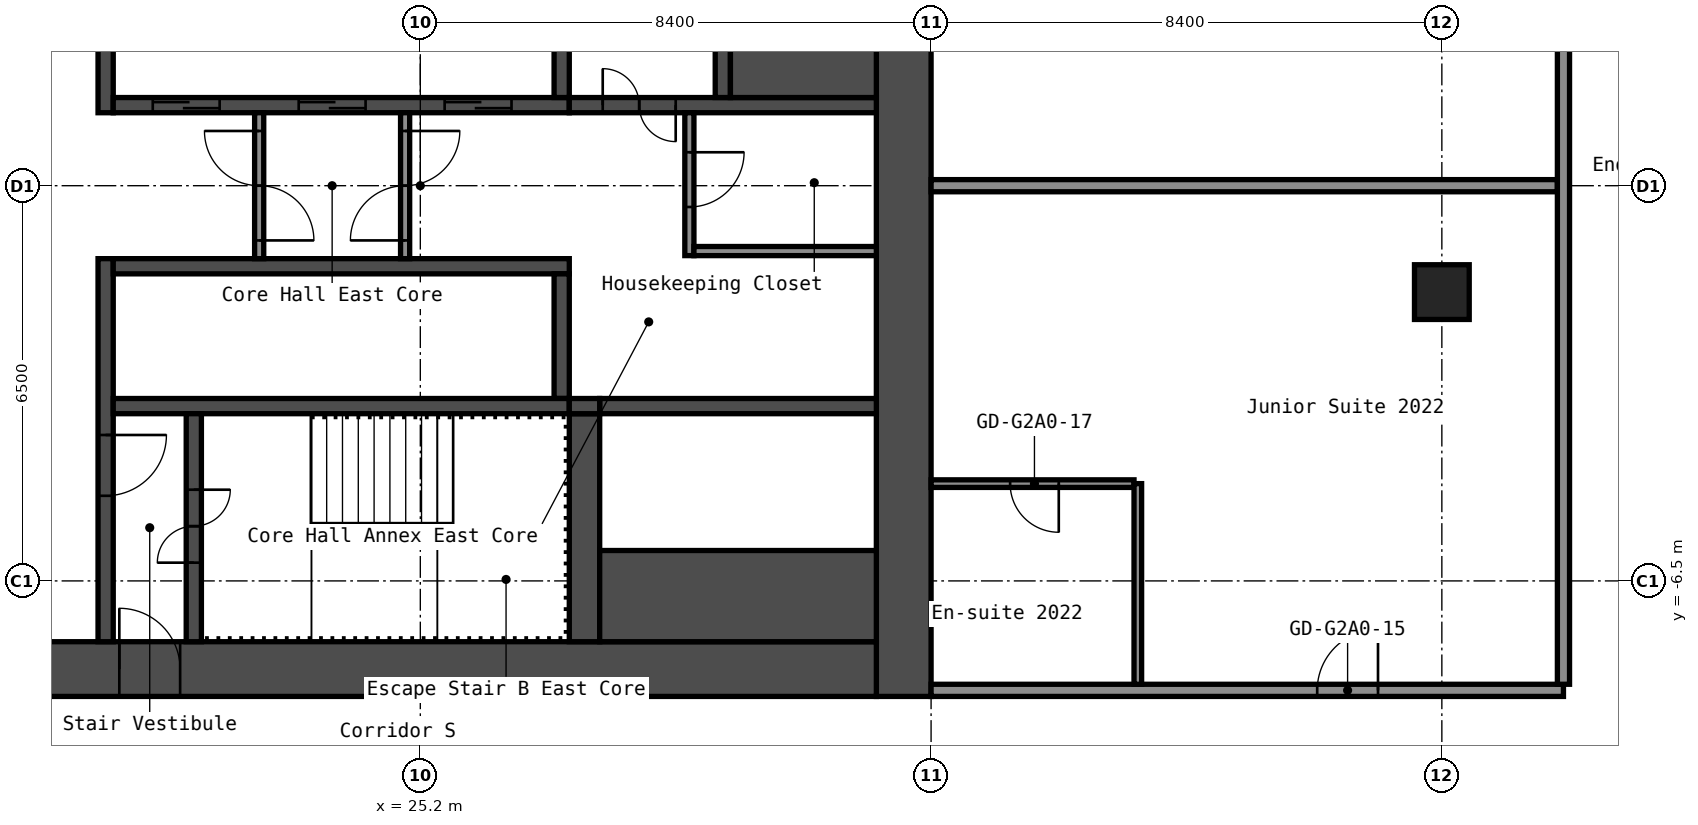
"""IFC4 building model, lengths in metres.
Left out: names, types, materials, properties, quantities, classifications, styles, units other than length and angle.
Written with IfcOpenShell. Run it as: python <this file> out.ifc"""

import sys

from ifc_helpers import new_model, si_unit, direction, frame, frame_2d, origin, origin_2d, place, context, subcontext, project, spatial, rectangle, hollow_rectangle, extrude, element, fill, save


model = new_model("IFC4")
c1 = context("Model", 3, precision=1e-05, world=origin(), true_north=direction((0.0, 1.0)))
c2 = subcontext(c1, "Body", "Model", "MODEL_VIEW")
j1 = project(units=[si_unit("LENGTHUNIT", "METRE"), si_unit("PLANEANGLEUNIT", "RADIAN")], contexts=[c1])
p1 = place(None, origin())
s1 = spatial("IfcSite", under=j1, at=p1, CompositionType="ELEMENT")
p2 = place(p1, origin())
s2 = spatial("IfcBuilding", under=s1, at=p2, CompositionType="ELEMENT")
p3 = place(p2, frame((0.0, 0.0, 75.4)))
s3 = spatial("IfcBuildingStorey", under=s2, at=p3, CompositionType="ELEMENT", Elevation=75.4)
p4 = place(p3, frame((42.0, -1.75, 0.0), z_axis=(0.0, 0.0, 1.0), x_axis=(1.0, 0.0, 0.0)))
e1 = element("IfcColumn", 1, at=p4, inside=s3, PredefinedType="COLUMN", context=c2, shape_type="SweptSolid", body=[
    extrude(hollow_rectangle(XDim=0.9, YDim=0.9, WallThickness=0.036, at=origin_2d()), origin(), (0.0, 0.0, 1.0), 2.8),
])
p5 = place(p3, frame((33.15, -8.4, 0.0), z_axis=(0.0, 0.0, 1.0), x_axis=(0.0, 1.0, 0.0)))
e2 = element("IfcWall", 2, at=p5, inside=s3, PredefinedType="SHEAR", context=c2, shape_type="SweptSolid", body=[
    extrude(rectangle(XDim=16.8, YDim=0.9, at=frame_2d((8.4, 0.0))), origin(), (0.0, 0.0, 1.0), 2.8),
])
p6 = place(p3, frame((17.7, -7.95, 0.0), z_axis=(0.0, 0.0, 1.0), x_axis=(1.0, 0.0, 0.0)))
e3 = element("IfcWall", 3, at=p6, inside=s3, PredefinedType="SHEAR", context=c2, shape_type="SweptSolid", body=[
    extrude(rectangle(XDim=15.0, YDim=0.9, at=frame_2d((7.5, 0.0))), origin(), (0.0, 0.0, 1.0), 2.8),
])
p7 = place(p6, frame((2.55, 0.0, 0.0)))
e4 = element("IfcOpeningElement", 4, at=p7, cuts=e3, PredefinedType="OPENING", context=c2, shape_type="SweptSolid", body=[
    extrude(rectangle(XDim=1.0, YDim=2.1, at=frame_2d((0.5, 1.05))), frame((0.0, 0.46, 0.0), z_axis=(0.0, -1.0, 0.0), x_axis=(1.0, 0.0, 0.0)), (0.0, 0.0, 1.0), 0.92),
])
p8 = place(p3, frame((20.025, 1.2, 0.0), z_axis=(0.0, 0.0, 1.0), x_axis=(0.0, 1.0, 0.0)))
e5 = element("IfcWall", 5, at=p8, inside=s3, PredefinedType="SHEAR", context=c2, shape_type="SweptSolid", body=[
    extrude(rectangle(XDim=6.3, YDim=0.25, at=frame_2d((3.15, 0.0))), origin(), (0.0, 0.0, 1.0), 2.8),
])
p9 = place(p3, frame((20.025, -7.5, 0.0), z_axis=(0.0, 0.0, 1.0), x_axis=(0.0, 1.0, 0.0)))
e6 = element("IfcWall", 6, at=p9, inside=s3, PredefinedType="SHEAR", context=c2, shape_type="SweptSolid", body=[
    extrude(rectangle(XDim=6.3, YDim=0.25, at=frame_2d((3.15, 0.0))), origin(), (0.0, 0.0, 1.0), 2.8),
])
p10 = place(p9, frame((2.4, 0.0, 0.0)))
e7 = element("IfcOpeningElement", 7, at=p10, cuts=e6, PredefinedType="OPENING", context=c2, shape_type="SweptSolid", body=[
    extrude(rectangle(XDim=1.0, YDim=2.1, at=frame_2d((0.5, 1.05))), frame((0.0, 0.135, 0.0), z_axis=(0.0, -1.0, 0.0), x_axis=(1.0, 0.0, 0.0)), (0.0, 0.0, 1.0), 0.27),
])
p11 = place(p3, frame((20.15, 1.325, 0.0), z_axis=(0.0, 0.0, 1.0), x_axis=(1.0, 0.0, 0.0)))
e8 = element("IfcWall", 8, at=p11, inside=s3, PredefinedType="SHEAR", context=c2, shape_type="SweptSolid", body=[
    extrude(rectangle(XDim=7.5, YDim=0.25, at=frame_2d((3.75, 0.0))), origin(), (0.0, 0.0, 1.0), 2.8),
])
p12 = place(p11, frame((0.65, 0.0, 0.0)))
e9 = element("IfcOpeningElement", 9, at=p12, cuts=e8, PredefinedType="OPENING", context=c2, shape_type="SweptSolid", body=[
    extrude(rectangle(XDim=1.1, YDim=2.1, at=frame_2d((0.55, 1.05))), frame((0.0, 0.135, 0.0), z_axis=(0.0, -1.0, 0.0), x_axis=(1.0, 0.0, 0.0)), (0.0, 0.0, 1.0), 0.27),
])
p13 = place(p11, frame((3.05, 0.0, 0.0)))
e10 = element("IfcOpeningElement", 10, at=p13, cuts=e8, PredefinedType="OPENING", context=c2, shape_type="SweptSolid", body=[
    extrude(rectangle(XDim=1.1, YDim=2.1, at=frame_2d((0.55, 1.05))), frame((0.0, 0.135, 0.0), z_axis=(0.0, -1.0, 0.0), x_axis=(1.0, 0.0, 0.0)), (0.0, 0.0, 1.0), 0.27),
])
p14 = place(p11, frame((5.45, 0.0, 0.0)))
e11 = element("IfcOpeningElement", 11, at=p14, cuts=e8, PredefinedType="OPENING", context=c2, shape_type="SweptSolid", body=[
    extrude(rectangle(XDim=1.1, YDim=2.1, at=frame_2d((0.55, 1.05))), frame((0.0, 0.135, 0.0), z_axis=(0.0, -1.0, 0.0), x_axis=(1.0, 0.0, 0.0)), (0.0, 0.0, 1.0), 0.27),
])
p15 = place(p3, frame((27.525, 1.45, 0.0), z_axis=(0.0, 0.0, 1.0), x_axis=(0.0, 1.0, 0.0)))
e12 = element("IfcWall", 12, at=p15, inside=s3, PredefinedType="SHEAR", context=c2, shape_type="SweptSolid", body=[
    extrude(rectangle(XDim=2.05, YDim=0.25, at=frame_2d((1.025, 0.0))), origin(), (0.0, 0.0, 1.0), 2.8),
])
p16 = place(p3, frame((27.65, 1.325, 0.0), z_axis=(0.0, 0.0, 1.0), x_axis=(1.0, 0.0, 0.0)))
e13 = element("IfcWall", 13, at=p16, inside=s3, PredefinedType="SHEAR", context=c2, shape_type="SweptSolid", body=[
    extrude(rectangle(XDim=5.05, YDim=0.25, at=frame_2d((2.525, 0.0))), origin(), (0.0, 0.0, 1.0), 2.8),
])
p17 = place(p16, frame((0.55, 0.0, 0.0)))
e14 = element("IfcOpeningElement", 14, at=p17, cuts=e13, PredefinedType="OPENING", context=c2, shape_type="SweptSolid", body=[
    extrude(rectangle(XDim=1.2, YDim=2.1, at=frame_2d((0.6, 1.05))), frame((0.0, 0.135, 0.0), z_axis=(0.0, -1.0, 0.0), x_axis=(1.0, 0.0, 0.0)), (0.0, 0.0, 1.0), 0.27),
])
p18 = place(p3, frame((30.175, 1.45, 0.0), z_axis=(0.0, 0.0, 1.0), x_axis=(0.0, 1.0, 0.0)))
e15 = element("IfcWall", 15, at=p18, inside=s3, PredefinedType="SHEAR", context=c2, shape_type="SweptSolid", body=[
    extrude(rectangle(XDim=6.05, YDim=0.25, at=frame_2d((3.025, 0.0))), origin(), (0.0, 0.0, 1.0), 2.8),
])
p19 = place(p18, frame((2.625, 0.0, 0.0)))
e16 = element("IfcOpeningElement", 16, at=p19, cuts=e15, PredefinedType="OPENING", context=c2, shape_type="SweptSolid", body=[
    extrude(rectangle(XDim=1.1, YDim=2.1, at=frame_2d((0.55, 1.05))), frame((0.0, 0.135, 0.0), z_axis=(0.0, -1.0, 0.0), x_axis=(1.0, 0.0, 0.0)), (0.0, 0.0, 1.0), 0.27),
])
p20 = place(p3, frame((30.3, 2.375, 0.0), z_axis=(0.0, 0.0, 1.0), x_axis=(1.0, 0.0, 0.0)))
e17 = element("IfcWall", 17, at=p20, inside=s3, PredefinedType="SHEAR", context=c2, shape_type="SweptSolid", body=[
    extrude(rectangle(XDim=2.4, YDim=1.85, at=frame_2d((1.2, 0.0))), origin(), (0.0, 0.0, 1.0), 2.8),
])
p21 = place(p3, frame((20.15, -1.325, 0.0), z_axis=(0.0, 0.0, 1.0), x_axis=(1.0, 0.0, 0.0)))
e18 = element("IfcWall", 18, at=p21, inside=s3, PredefinedType="SHEAR", context=c2, shape_type="SweptSolid", body=[
    extrude(rectangle(XDim=7.5, YDim=0.25, at=frame_2d((3.75, 0.0))), origin(), (0.0, 0.0, 1.0), 2.8),
])
p22 = place(p3, frame((27.525, -3.5, 0.0), z_axis=(0.0, 0.0, 1.0), x_axis=(0.0, 1.0, 0.0)))
e19 = element("IfcWall", 19, at=p22, inside=s3, PredefinedType="SHEAR", context=c2, shape_type="SweptSolid", body=[
    extrude(rectangle(XDim=2.05, YDim=0.25, at=frame_2d((1.025, 0.0))), origin(), (0.0, 0.0, 1.0), 2.8),
])
p23 = place(p3, frame((20.15, -3.625, 0.0), z_axis=(0.0, 0.0, 1.0), x_axis=(1.0, 0.0, 0.0)))
e20 = element("IfcWall", 20, at=p23, inside=s3, PredefinedType="SHEAR", context=c2, shape_type="SweptSolid", body=[
    extrude(rectangle(XDim=7.5, YDim=0.25, at=frame_2d((3.75, 0.0))), origin(), (0.0, 0.0, 1.0), 2.8),
])
p24 = place(p3, frame((21.475, -7.5, 0.0), z_axis=(0.0, 0.0, 1.0), x_axis=(0.0, 1.0, 0.0)))
e21 = element("IfcWall", 21, at=p24, inside=s3, PredefinedType="SHEAR", context=c2, shape_type="SweptSolid", body=[
    extrude(rectangle(XDim=3.75, YDim=0.25, at=frame_2d((1.875, 0.0))), origin(), (0.0, 0.0, 1.0), 2.8),
])
p25 = place(p24, frame((1.3, 0.0, 0.0)))
e22 = element("IfcOpeningElement", 22, at=p25, cuts=e21, PredefinedType="OPENING", context=c2, shape_type="SweptSolid", body=[
    extrude(rectangle(XDim=1.2, YDim=2.1, at=frame_2d((0.6, 1.05))), frame((0.0, 0.135, 0.0), z_axis=(0.0, -1.0, 0.0), x_axis=(1.0, 0.0, 0.0)), (0.0, 0.0, 1.0), 0.27),
])
p26 = place(p3, frame((27.9, -7.5, 0.0), z_axis=(0.0, 0.0, 1.0), x_axis=(0.0, 1.0, 0.0)))
e23 = element("IfcWall", 23, at=p26, inside=s3, PredefinedType="SHEAR", context=c2, shape_type="SweptSolid", body=[
    extrude(rectangle(XDim=3.75, YDim=0.5, at=frame_2d((1.875, 0.0))), origin(), (0.0, 0.0, 1.0), 2.8),
])
p27 = place(p3, frame((28.15, -3.625, 0.0), z_axis=(0.0, 0.0, 1.0), x_axis=(1.0, 0.0, 0.0)))
e24 = element("IfcWall", 24, at=p27, inside=s3, PredefinedType="SHEAR", context=c2, shape_type="SweptSolid", body=[
    extrude(rectangle(XDim=4.55, YDim=0.25, at=frame_2d((2.275, 0.0))), origin(), (0.0, 0.0, 1.0), 2.8),
])
p28 = place(p3, frame((28.15, -6.75, 0.0), z_axis=(0.0, 0.0, 1.0), x_axis=(1.0, 0.0, 0.0)))
e25 = element("IfcWall", 25, at=p28, inside=s3, PredefinedType="SHEAR", context=c2, shape_type="SweptSolid", body=[
    extrude(rectangle(XDim=4.55, YDim=1.5, at=frame_2d((2.275, 0.0))), origin(), (0.0, 0.0, 1.0), 2.8),
])
p29 = place(p3, frame((27.65, -3.625, 0.0), z_axis=(0.0, 0.0, 1.0), x_axis=(1.0, 0.0, 0.0)))
e26 = element("IfcWall", 26, at=p29, inside=s3, PredefinedType="SHEAR", context=c2, shape_type="SweptSolid", body=[
    extrude(rectangle(XDim=0.5, YDim=0.25, at=frame_2d((0.25, 0.0))), origin(), (0.0, 0.0, 1.0), 2.8),
])
p30 = place(p3, frame((22.55, -1.2, 0.0), z_axis=(0.0, 0.0, 1.0), x_axis=(0.0, 1.0, 0.0)))
e27 = element("IfcWall", 27, at=p30, inside=s3, PredefinedType="PARTITIONING", context=c2, shape_type="SweptSolid", body=[
    extrude(rectangle(XDim=2.4, YDim=0.15, at=frame_2d((1.2, 0.0))), origin(), (0.0, 0.0, 1.0), 2.8),
])
p31 = place(p30, frame((0.3, 0.0, 0.0)))
e28 = element("IfcOpeningElement", 28, at=p31, cuts=e27, PredefinedType="OPENING", context=c2, shape_type="SweptSolid", body=[
    extrude(rectangle(XDim=1.8, YDim=2.1, at=frame_2d((0.9, 1.05))), frame((0.0, 0.085, 0.0), z_axis=(0.0, -1.0, 0.0), x_axis=(1.0, 0.0, 0.0)), (0.0, 0.0, 1.0), 0.17),
])
p32 = place(p3, frame((24.95, -1.2, 0.0), z_axis=(0.0, 0.0, 1.0), x_axis=(0.0, 1.0, 0.0)))
e29 = element("IfcWall", 29, at=p32, inside=s3, PredefinedType="PARTITIONING", context=c2, shape_type="SweptSolid", body=[
    extrude(rectangle(XDim=2.4, YDim=0.15, at=frame_2d((1.2, 0.0))), origin(), (0.0, 0.0, 1.0), 2.8),
])
p33 = place(p32, frame((0.3, 0.0, 0.0)))
e30 = element("IfcOpeningElement", 30, at=p33, cuts=e29, PredefinedType="OPENING", context=c2, shape_type="SweptSolid", body=[
    extrude(rectangle(XDim=1.8, YDim=2.1, at=frame_2d((0.9, 1.05))), frame((0.0, 0.085, 0.0), z_axis=(0.0, -1.0, 0.0), x_axis=(1.0, 0.0, 0.0)), (0.0, 0.0, 1.0), 0.17),
])
p34 = place(p3, frame((29.625, -1.15, 0.0), z_axis=(0.0, 0.0, 1.0), x_axis=(0.0, 1.0, 0.0)))
e31 = element("IfcWall", 31, at=p34, inside=s3, PredefinedType="PARTITIONING", context=c2, shape_type="SweptSolid", body=[
    extrude(rectangle(XDim=2.35, YDim=0.15, at=frame_2d((1.175, 0.0))), origin(), (0.0, 0.0, 1.0), 2.8),
])
p35 = place(p34, frame((0.8, 0.0, 0.0)))
e32 = element("IfcOpeningElement", 32, at=p35, cuts=e31, PredefinedType="OPENING", context=c2, shape_type="SweptSolid", body=[
    extrude(rectangle(XDim=0.9, YDim=2.1, at=frame_2d((0.45, 1.05))), frame((0.0, 0.085, 0.0), z_axis=(0.0, -1.0, 0.0), x_axis=(1.0, 0.0, 0.0)), (0.0, 0.0, 1.0), 0.17),
])
p36 = place(p3, frame((29.7, -1.075, 0.0), z_axis=(0.0, 0.0, 1.0), x_axis=(1.0, 0.0, 0.0)))
e33 = element("IfcWall", 33, at=p36, inside=s3, PredefinedType="PARTITIONING", context=c2, shape_type="SweptSolid", body=[
    extrude(rectangle(XDim=3.0, YDim=0.15, at=frame_2d((1.5, 0.0))), origin(), (0.0, 0.0, 1.0), 2.8),
])
p37 = place(p3, frame((33.6, -8.3, 0.0), z_axis=(0.0, 0.0, 1.0), x_axis=(1.0, 0.0, 0.0)))
e34 = element("IfcWall", 34, at=p37, inside=s3, PredefinedType="PARTITIONING", context=c2, shape_type="SweptSolid", body=[
    extrude(rectangle(XDim=10.4, YDim=0.2, at=frame_2d((5.2, 0.0))), origin(), (0.0, 0.0, 1.0), 2.8),
])
p38 = place(p37, frame((6.35, 0.0, 0.0)))
e35 = element("IfcOpeningElement", 35, at=p38, cuts=e34, PredefinedType="OPENING", context=c2, shape_type="SweptSolid", body=[
    extrude(rectangle(XDim=1.0, YDim=2.1, at=frame_2d((0.5, 1.05))), frame((0.0, 0.11, 0.0), z_axis=(0.0, -1.0, 0.0), x_axis=(1.0, 0.0, 0.0)), (0.0, 0.0, 1.0), 0.22),
])
p39 = place(p3, frame((33.6, -4.9, 0.0), z_axis=(0.0, 0.0, 1.0), x_axis=(1.0, 0.0, 0.0)))
e36 = element("IfcWall", 36, at=p39, inside=s3, PredefinedType="PARTITIONING", context=c2, shape_type="SweptSolid", body=[
    extrude(rectangle(XDim=3.337, YDim=0.125, at=frame_2d((1.669, 0.0))), origin(), (0.0, 0.0, 1.0), 2.8),
])
p40 = place(p39, frame((1.3, 0.0, 0.0)))
e37 = element("IfcOpeningElement", 37, at=p40, cuts=e36, PredefinedType="OPENING", context=c2, shape_type="SweptSolid", body=[
    extrude(rectangle(XDim=0.8, YDim=2.1, at=frame_2d((0.4, 1.05))), frame((0.0, 0.073, 0.0), z_axis=(0.0, -1.0, 0.0), x_axis=(1.0, 0.0, 0.0)), (0.0, 0.0, 1.0), 0.145),
])
p41 = place(p3, frame((33.6, 0.0, 0.0), z_axis=(0.0, 0.0, 1.0), x_axis=(1.0, 0.0, 0.0)))
e38 = element("IfcWall", 38, at=p41, inside=s3, PredefinedType="PARTITIONING", context=c2, shape_type="SweptSolid", body=[
    extrude(rectangle(XDim=10.3, YDim=0.2, at=frame_2d((5.15, 0.0))), origin(), (0.0, 0.0, 1.0), 2.8),
])
p42 = place(p3, frame((37.0, -8.2, 0.0), z_axis=(0.0, 0.0, 1.0), x_axis=(0.0, 1.0, 0.0)))
e39 = element("IfcWall", 39, at=p42, inside=s3, PredefinedType="PARTITIONING", context=c2, shape_type="SweptSolid", body=[
    extrude(rectangle(XDim=3.3, YDim=0.125, at=frame_2d((1.65, 0.0))), origin(), (0.0, 0.0, 1.0), 2.8),
])
p43 = place(p3, frame((44.0, -8.2, 0.0), z_axis=(0.0, 0.0, 1.0), x_axis=(0.0, 1.0, 0.0)))
e40 = element("IfcWall", 40, at=p43, inside=s3, PredefinedType="PARTITIONING", context=c2, shape_type="SweptSolid", body=[
    extrude(rectangle(XDim=16.4, YDim=0.2, at=frame_2d((8.2, 0.0))), origin(), (0.0, 0.0, 1.0), 2.8),
])
p44 = place(p7, origin())
e41 = element("IfcDoor", 41, at=p44, inside=s3, OperationType="SINGLE_SWING_RIGHT", PredefinedType="DOOR", context=c2, shape_type="SweptSolid", body=[
    extrude(rectangle(XDim=1.0, YDim=2.1, at=frame_2d((0.5, 1.05))), frame((0.0, 0.025, 0.0), z_axis=(0.0, -1.0, 0.0), x_axis=(1.0, 0.0, 0.0)), (0.0, 0.0, 1.0), 0.05),
])
fill(e4, e41)
p45 = place(p25, origin())
e42 = element("IfcDoor", 42, at=p45, inside=s3, OperationType="DOUBLE_DOOR_SINGLE_SWING", PredefinedType="DOOR", context=c2, shape_type="SweptSolid", body=[
    extrude(rectangle(XDim=1.2, YDim=2.1, at=frame_2d((0.6, 1.05))), frame((0.0, 0.025, 0.0), z_axis=(0.0, -1.0, 0.0), x_axis=(1.0, 0.0, 0.0)), (0.0, 0.0, 1.0), 0.05),
])
fill(e22, e42)
p46 = place(p10, origin())
e43 = element("IfcDoor", 43, at=p46, inside=s3, OperationType="SINGLE_SWING_RIGHT", PredefinedType="DOOR", context=c2, shape_type="SweptSolid", body=[
    extrude(rectangle(XDim=1.0, YDim=2.1, at=frame_2d((0.5, 1.05))), frame((0.0, 0.025, 0.0), z_axis=(0.0, -1.0, 0.0), x_axis=(1.0, 0.0, 0.0)), (0.0, 0.0, 1.0), 0.05),
])
fill(e7, e43)
p47 = place(p17, origin())
e44 = element("IfcDoor", 44, at=p47, inside=s3, OperationType="DOUBLE_DOOR_SINGLE_SWING", PredefinedType="DOOR", context=c2, shape_type="SweptSolid", body=[
    extrude(rectangle(XDim=1.2, YDim=2.1, at=frame_2d((0.6, 1.05))), frame((0.0, 0.025, 0.0), z_axis=(0.0, -1.0, 0.0), x_axis=(1.0, 0.0, 0.0)), (0.0, 0.0, 1.0), 0.05),
])
fill(e14, e44)
p48 = place(p31, origin())
e45 = element("IfcDoor", 45, at=p48, inside=s3, OperationType="DOUBLE_DOOR_SINGLE_SWING", PredefinedType="DOOR", context=c2, shape_type="SweptSolid", body=[
    extrude(rectangle(XDim=1.8, YDim=2.1, at=frame_2d((0.9, 1.05))), frame((0.0, 0.025, 0.0), z_axis=(0.0, -1.0, 0.0), x_axis=(1.0, 0.0, 0.0)), (0.0, 0.0, 1.0), 0.05),
])
fill(e28, e45)
p49 = place(p33, origin())
e46 = element("IfcDoor", 46, at=p49, inside=s3, OperationType="DOUBLE_DOOR_SINGLE_SWING", PredefinedType="DOOR", context=c2, shape_type="SweptSolid", body=[
    extrude(rectangle(XDim=1.8, YDim=2.1, at=frame_2d((0.9, 1.05))), frame((0.0, 0.025, 0.0), z_axis=(0.0, -1.0, 0.0), x_axis=(1.0, 0.0, 0.0)), (0.0, 0.0, 1.0), 0.05),
])
fill(e30, e46)
p50 = place(p35, origin())
e47 = element("IfcDoor", 47, at=p50, inside=s3, OperationType="SINGLE_SWING_RIGHT", PredefinedType="DOOR", context=c2, shape_type="SweptSolid", body=[
    extrude(rectangle(XDim=0.9, YDim=2.1, at=frame_2d((0.45, 1.05))), frame((0.0, 0.025, 0.0), z_axis=(0.0, -1.0, 0.0), x_axis=(1.0, 0.0, 0.0)), (0.0, 0.0, 1.0), 0.05),
])
fill(e32, e47)
p51 = place(p12, origin())
e48 = element("IfcDoor", 48, at=p51, inside=s3, OperationType="DOUBLE_DOOR_SLIDING", PredefinedType="DOOR", context=c2, shape_type="SweptSolid", body=[
    extrude(rectangle(XDim=1.1, YDim=2.1, at=frame_2d((0.55, 1.05))), frame((0.0, 0.025, 0.0), z_axis=(0.0, -1.0, 0.0), x_axis=(1.0, 0.0, 0.0)), (0.0, 0.0, 1.0), 0.05),
])
fill(e9, e48)
p52 = place(p13, origin())
e49 = element("IfcDoor", 49, at=p52, inside=s3, OperationType="DOUBLE_DOOR_SLIDING", PredefinedType="DOOR", context=c2, shape_type="SweptSolid", body=[
    extrude(rectangle(XDim=1.1, YDim=2.1, at=frame_2d((0.55, 1.05))), frame((0.0, 0.025, 0.0), z_axis=(0.0, -1.0, 0.0), x_axis=(1.0, 0.0, 0.0)), (0.0, 0.0, 1.0), 0.05),
])
fill(e10, e49)
p53 = place(p14, origin())
e50 = element("IfcDoor", 50, at=p53, inside=s3, OperationType="DOUBLE_DOOR_SLIDING", PredefinedType="DOOR", context=c2, shape_type="SweptSolid", body=[
    extrude(rectangle(XDim=1.1, YDim=2.1, at=frame_2d((0.55, 1.05))), frame((0.0, 0.025, 0.0), z_axis=(0.0, -1.0, 0.0), x_axis=(1.0, 0.0, 0.0)), (0.0, 0.0, 1.0), 0.05),
])
fill(e11, e50)
p54 = place(p38, origin())
e51 = element("IfcDoor", 51, at=p54, inside=s3, OperationType="SINGLE_SWING_LEFT", PredefinedType="DOOR", context=c2, shape_type="SweptSolid", body=[
    extrude(rectangle(XDim=1.0, YDim=2.1, at=frame_2d((0.5, 1.05))), frame((0.0, 0.025, 0.0), z_axis=(0.0, -1.0, 0.0), x_axis=(1.0, 0.0, 0.0)), (0.0, 0.0, 1.0), 0.05),
])
fill(e35, e51)
p55 = place(p40, origin())
e52 = element("IfcDoor", 52, at=p55, inside=s3, OperationType="SINGLE_SWING_RIGHT", PredefinedType="DOOR", context=c2, shape_type="SweptSolid", body=[
    extrude(rectangle(XDim=0.8, YDim=2.1, at=frame_2d((0.4, 1.05))), frame((0.0, 0.025, 0.0), z_axis=(0.0, -1.0, 0.0), x_axis=(1.0, 0.0, 0.0)), (0.0, 0.0, 1.0), 0.05),
])
fill(e37, e52)
save(model, sys.argv[1])
